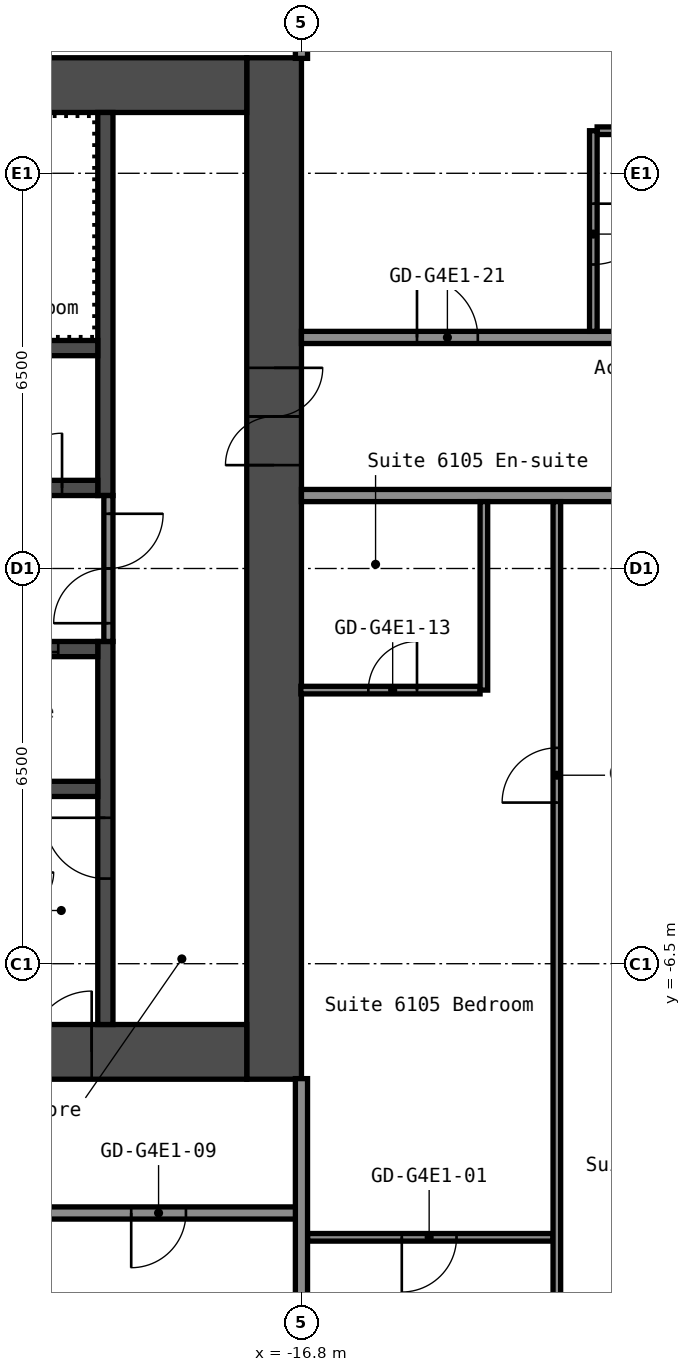
"""IFC4 building model, lengths in metres.
Left out: names, types, materials, properties, quantities, classifications, styles, units other than length and angle.
Written with IfcOpenShell. Run it as: python <this file> out.ifc"""

import sys

from ifc_helpers import new_model, si_unit, direction, frame, frame_2d, origin, place, context, subcontext, project, spatial, rectangle, extrude, element, fill, save


model = new_model("IFC4")
c1 = context("Model", 3, precision=1e-05, world=origin(), true_north=direction((0.0, 1.0)))
c2 = subcontext(c1, "Body", "Model", "MODEL_VIEW")
j1 = project(units=[si_unit("LENGTHUNIT", "METRE"), si_unit("PLANEANGLEUNIT", "RADIAN")], contexts=[c1])
p1 = place(None, origin())
s1 = spatial("IfcSite", under=j1, at=p1, CompositionType="ELEMENT")
p2 = place(p1, origin())
s2 = spatial("IfcBuilding", under=s1, at=p2, CompositionType="ELEMENT")
p3 = place(p2, frame((0.0, 0.0, 215.4)))
s3 = spatial("IfcBuildingStorey", under=s2, at=p3, CompositionType="ELEMENT", Elevation=215.4)
p4 = place(p3, frame((-17.25, -8.4, 0.0), z_axis=(0.0, 0.0, 1.0), x_axis=(0.0, 1.0, 0.0)))
e1 = element("IfcWall", 1, at=p4, inside=s3, PredefinedType="SHEAR", context=c2, shape_type="SweptSolid", body=[
    extrude(rectangle(XDim=16.8, YDim=0.9, at=frame_2d((8.4, 0.0))), origin(), (0.0, 0.0, 1.0), 2.75),
])
p5 = place(p4, frame((10.1, 0.0, 0.0)))
e2 = element("IfcOpeningElement", 2, at=p5, cuts=e1, PredefinedType="OPENING", context=c2, shape_type="SweptSolid", body=[
    extrude(rectangle(XDim=1.6, YDim=2.1, at=frame_2d((0.8, 1.05))), frame((0.0, 0.46, 0.0), z_axis=(0.0, -1.0, 0.0), x_axis=(1.0, 0.0, 0.0)), (0.0, 0.0, 1.0), 0.92),
])
p6 = place(p3, frame((-32.7, 7.95, 0.0), z_axis=(0.0, 0.0, 1.0), x_axis=(1.0, 0.0, 0.0)))
e3 = element("IfcWall", 3, at=p6, inside=s3, PredefinedType="SHEAR", context=c2, shape_type="SweptSolid", body=[
    extrude(rectangle(XDim=15.0, YDim=0.9, at=frame_2d((7.5, 0.0))), origin(), (0.0, 0.0, 1.0), 2.75),
])
p7 = place(p6, frame((3.4, 0.0, 0.0)))
e4 = element("IfcOpeningElement", 4, at=p7, cuts=e3, PredefinedType="OPENING", context=c2, shape_type="SweptSolid", body=[
    extrude(rectangle(XDim=1.2, YDim=2.1, at=frame_2d((0.6, 1.05))), frame((0.0, 0.46, 0.0), z_axis=(0.0, -1.0, 0.0), x_axis=(1.0, 0.0, 0.0)), (0.0, 0.0, 1.0), 0.92),
])
p8 = place(p6, frame((0.75, 0.0, 0.0)))
e5 = element("IfcOpeningElement", 5, at=p8, cuts=e3, PredefinedType="OPENING", context=c2, shape_type="SweptSolid", body=[
    extrude(rectangle(XDim=0.9, YDim=2.1, at=frame_2d((0.45, 1.05))), frame((0.0, 0.46, 0.0), z_axis=(0.0, -1.0, 0.0), x_axis=(1.0, 0.0, 0.0)), (0.0, 0.0, 1.0), 0.92),
])
p9 = place(p3, frame((-32.7, -7.95, 0.0), z_axis=(0.0, 0.0, 1.0), x_axis=(1.0, 0.0, 0.0)))
e6 = element("IfcWall", 6, at=p9, inside=s3, PredefinedType="SHEAR", context=c2, shape_type="SweptSolid", body=[
    extrude(rectangle(XDim=15.0, YDim=0.9, at=frame_2d((7.5, 0.0))), origin(), (0.0, 0.0, 1.0), 2.75),
])
p10 = place(p9, frame((11.45, 0.0, 0.0)))
e7 = element("IfcOpeningElement", 7, at=p10, cuts=e6, PredefinedType="OPENING", context=c2, shape_type="SweptSolid", body=[
    extrude(rectangle(XDim=1.0, YDim=2.1, at=frame_2d((0.5, 1.05))), frame((0.0, 0.46, 0.0), z_axis=(0.0, -1.0, 0.0), x_axis=(1.0, 0.0, 0.0)), (0.0, 0.0, 1.0), 0.92),
])
p11 = place(p3, frame((-20.025, 1.2, 0.0), z_axis=(0.0, 0.0, 1.0), x_axis=(0.0, 1.0, 0.0)))
e8 = element("IfcWall", 8, at=p11, inside=s3, PredefinedType="SHEAR", context=c2, shape_type="SweptSolid", body=[
    extrude(rectangle(XDim=6.3, YDim=0.25, at=frame_2d((3.15, 0.0))), origin(), (0.0, 0.0, 1.0), 2.75),
])
p12 = place(p3, frame((-20.025, -7.5, 0.0), z_axis=(0.0, 0.0, 1.0), x_axis=(0.0, 1.0, 0.0)))
e9 = element("IfcWall", 9, at=p12, inside=s3, PredefinedType="SHEAR", context=c2, shape_type="SweptSolid", body=[
    extrude(rectangle(XDim=6.3, YDim=0.25, at=frame_2d((3.15, 0.0))), origin(), (0.0, 0.0, 1.0), 2.75),
])
p13 = place(p12, frame((2.4, 0.0, 0.0)))
e10 = element("IfcOpeningElement", 10, at=p13, cuts=e9, PredefinedType="OPENING", context=c2, shape_type="SweptSolid", body=[
    extrude(rectangle(XDim=1.0, YDim=2.1, at=frame_2d((0.5, 1.05))), frame((0.0, 0.135, 0.0), z_axis=(0.0, -1.0, 0.0), x_axis=(1.0, 0.0, 0.0)), (0.0, 0.0, 1.0), 0.27),
])
p14 = place(p3, frame((-27.65, 1.325, 0.0), z_axis=(0.0, 0.0, 1.0), x_axis=(1.0, 0.0, 0.0)))
e11 = element("IfcWall", 11, at=p14, inside=s3, PredefinedType="SHEAR", context=c2, shape_type="SweptSolid", body=[
    extrude(rectangle(XDim=7.5, YDim=0.25, at=frame_2d((3.75, 0.0))), origin(), (0.0, 0.0, 1.0), 2.75),
])
p15 = place(p14, frame((6.012, 0.0, 0.0)))
e12 = element("IfcOpeningElement", 12, at=p15, cuts=e11, PredefinedType="OPENING", context=c2, shape_type="SweptSolid", body=[
    extrude(rectangle(XDim=0.9, YDim=2.1, at=frame_2d((0.45, 1.05))), frame((0.0, 0.135, 0.0), z_axis=(0.0, -1.0, 0.0), x_axis=(1.0, 0.0, 0.0)), (0.0, 0.0, 1.0), 0.27),
])
p16 = place(p14, frame((2.312, 0.0, 0.0)))
e13 = element("IfcOpeningElement", 13, at=p16, cuts=e11, PredefinedType="OPENING", context=c2, shape_type="SweptSolid", body=[
    extrude(rectangle(XDim=0.9, YDim=2.1, at=frame_2d((0.45, 1.05))), frame((0.0, 0.135, 0.0), z_axis=(0.0, -1.0, 0.0), x_axis=(1.0, 0.0, 0.0)), (0.0, 0.0, 1.0), 0.27),
])
p17 = place(p3, frame((-27.65, 3.625, 0.0), z_axis=(0.0, 0.0, 1.0), x_axis=(1.0, 0.0, 0.0)))
e14 = element("IfcWall", 14, at=p17, inside=s3, PredefinedType="SHEAR", context=c2, shape_type="SweptSolid", body=[
    extrude(rectangle(XDim=7.5, YDim=0.25, at=frame_2d((3.75, 0.0))), origin(), (0.0, 0.0, 1.0), 2.75),
])
p18 = place(p3, frame((-27.65, -1.325, 0.0), z_axis=(0.0, 0.0, 1.0), x_axis=(1.0, 0.0, 0.0)))
e15 = element("IfcWall", 15, at=p18, inside=s3, PredefinedType="SHEAR", context=c2, shape_type="SweptSolid", body=[
    extrude(rectangle(XDim=7.5, YDim=0.25, at=frame_2d((3.75, 0.0))), origin(), (0.0, 0.0, 1.0), 2.75),
])
p19 = place(p18, frame((5.75, 0.0, 0.0)))
e16 = element("IfcOpeningElement", 16, at=p19, cuts=e15, PredefinedType="OPENING", context=c2, shape_type="SweptSolid", body=[
    extrude(rectangle(XDim=1.1, YDim=2.1, at=frame_2d((0.55, 1.05))), frame((0.0, 0.135, 0.0), z_axis=(0.0, -1.0, 0.0), x_axis=(1.0, 0.0, 0.0)), (0.0, 0.0, 1.0), 0.27),
])
p20 = place(p18, frame((3.35, 0.0, 0.0)))
e17 = element("IfcOpeningElement", 17, at=p20, cuts=e15, PredefinedType="OPENING", context=c2, shape_type="SweptSolid", body=[
    extrude(rectangle(XDim=1.1, YDim=2.1, at=frame_2d((0.55, 1.05))), frame((0.0, 0.135, 0.0), z_axis=(0.0, -1.0, 0.0), x_axis=(1.0, 0.0, 0.0)), (0.0, 0.0, 1.0), 0.27),
])
p21 = place(p18, frame((0.95, 0.0, 0.0)))
e18 = element("IfcOpeningElement", 18, at=p21, cuts=e15, PredefinedType="OPENING", context=c2, shape_type="SweptSolid", body=[
    extrude(rectangle(XDim=1.1, YDim=2.1, at=frame_2d((0.55, 1.05))), frame((0.0, 0.135, 0.0), z_axis=(0.0, -1.0, 0.0), x_axis=(1.0, 0.0, 0.0)), (0.0, 0.0, 1.0), 0.27),
])
p22 = place(p3, frame((-27.65, -3.625, 0.0), z_axis=(0.0, 0.0, 1.0), x_axis=(1.0, 0.0, 0.0)))
e19 = element("IfcWall", 19, at=p22, inside=s3, PredefinedType="SHEAR", context=c2, shape_type="SweptSolid", body=[
    extrude(rectangle(XDim=7.5, YDim=0.25, at=frame_2d((3.75, 0.0))), origin(), (0.0, 0.0, 1.0), 2.75),
])
p23 = place(p3, frame((-19.975, -1.2, 0.0), z_axis=(0.0, 0.0, 1.0), x_axis=(0.0, 1.0, 0.0)))
e20 = element("IfcWall", 20, at=p23, inside=s3, PredefinedType="PARTITIONING", context=c2, shape_type="SweptSolid", body=[
    extrude(rectangle(XDim=2.4, YDim=0.15, at=frame_2d((1.2, 0.0))), origin(), (0.0, 0.0, 1.0), 2.75),
])
p24 = place(p23, frame((0.3, 0.0, 0.0)))
e21 = element("IfcOpeningElement", 21, at=p24, cuts=e20, PredefinedType="OPENING", context=c2, shape_type="SweptSolid", body=[
    extrude(rectangle(XDim=1.8, YDim=2.1, at=frame_2d((0.9, 1.05))), frame((0.0, 0.085, 0.0), z_axis=(0.0, -1.0, 0.0), x_axis=(1.0, 0.0, 0.0)), (0.0, 0.0, 1.0), 0.17),
])
p25 = place(p3, frame((-16.7, -11.0, 0.0), z_axis=(0.0, 0.0, 1.0), x_axis=(1.0, 0.0, 0.0)))
e22 = element("IfcWall", 22, at=p25, inside=s3, PredefinedType="PARTITIONING", context=c2, shape_type="SweptSolid", body=[
    extrude(rectangle(XDim=4.037, YDim=0.125, at=frame_2d((2.019, 0.0))), origin(), (0.0, 0.0, 1.0), 2.75),
])
p26 = place(p25, frame((1.55, 0.0, 0.0)))
e23 = element("IfcOpeningElement", 23, at=p26, cuts=e22, PredefinedType="OPENING", context=c2, shape_type="SweptSolid", body=[
    extrude(rectangle(XDim=0.9, YDim=2.1, at=frame_2d((0.45, 1.05))), frame((0.0, 0.073, 0.0), z_axis=(0.0, -1.0, 0.0), x_axis=(1.0, 0.0, 0.0)), (0.0, 0.0, 1.0), 0.145),
])
p27 = place(p3, frame((-38.1, -10.6, 0.0), z_axis=(0.0, 0.0, 1.0), x_axis=(1.0, 0.0, 0.0)))
e24 = element("IfcWall", 24, at=p27, inside=s3, PredefinedType="PARTITIONING", context=c2, shape_type="SweptSolid", body=[
    extrude(rectangle(XDim=21.3, YDim=0.2, at=frame_2d((10.65, 0.0))), origin(), (0.0, 0.0, 1.0), 2.75),
])
p28 = place(p27, frame((1.95, 0.0, 0.0)))
e25 = element("IfcOpeningElement", 25, at=p28, cuts=e24, PredefinedType="OPENING", context=c2, shape_type="SweptSolid", body=[
    extrude(rectangle(XDim=0.9, YDim=2.1, at=frame_2d((0.45, 1.05))), frame((0.0, 0.11, 0.0), z_axis=(0.0, -1.0, 0.0), x_axis=(1.0, 0.0, 0.0)), (0.0, 0.0, 1.0), 0.22),
])
p29 = place(p27, frame((6.4, 0.0, 0.0)))
e26 = element("IfcOpeningElement", 26, at=p29, cuts=e24, PredefinedType="OPENING", context=c2, shape_type="SweptSolid", body=[
    extrude(rectangle(XDim=0.9, YDim=2.1, at=frame_2d((0.45, 1.05))), frame((0.0, 0.11, 0.0), z_axis=(0.0, -1.0, 0.0), x_axis=(1.0, 0.0, 0.0)), (0.0, 0.0, 1.0), 0.22),
])
p30 = place(p27, frame((10.6, 0.0, 0.0)))
e27 = element("IfcOpeningElement", 27, at=p30, cuts=e24, PredefinedType="OPENING", context=c2, shape_type="SweptSolid", body=[
    extrude(rectangle(XDim=0.9, YDim=2.1, at=frame_2d((0.45, 1.05))), frame((0.0, 0.11, 0.0), z_axis=(0.0, -1.0, 0.0), x_axis=(1.0, 0.0, 0.0)), (0.0, 0.0, 1.0), 0.22),
])
p31 = place(p27, frame((14.3, 0.0, 0.0)))
e28 = element("IfcOpeningElement", 28, at=p31, cuts=e24, PredefinedType="OPENING", context=c2, shape_type="SweptSolid", body=[
    extrude(rectangle(XDim=0.9, YDim=2.1, at=frame_2d((0.45, 1.05))), frame((0.0, 0.11, 0.0), z_axis=(0.0, -1.0, 0.0), x_axis=(1.0, 0.0, 0.0)), (0.0, 0.0, 1.0), 0.22),
])
p32 = place(p27, frame((18.5, 0.0, 0.0)))
e29 = element("IfcOpeningElement", 29, at=p32, cuts=e24, PredefinedType="OPENING", context=c2, shape_type="SweptSolid", body=[
    extrude(rectangle(XDim=0.9, YDim=2.1, at=frame_2d((0.45, 1.05))), frame((0.0, 0.11, 0.0), z_axis=(0.0, -1.0, 0.0), x_axis=(1.0, 0.0, 0.0)), (0.0, 0.0, 1.0), 0.22),
])
p33 = place(p3, frame((-16.81, -2.0, 0.0), z_axis=(0.0, 0.0, 1.0), x_axis=(1.0, 0.0, 0.0)))
e30 = element("IfcWall", 30, at=p33, inside=s3, PredefinedType="PARTITIONING", context=c2, shape_type="SweptSolid", body=[
    extrude(rectangle(XDim=2.948, YDim=0.125, at=frame_2d((1.474, 0.0))), origin(), (0.0, 0.0, 1.0), 2.75),
])
p34 = place(p33, frame((1.11, 0.0, 0.0)))
e31 = element("IfcOpeningElement", 31, at=p34, cuts=e30, PredefinedType="OPENING", context=c2, shape_type="SweptSolid", body=[
    extrude(rectangle(XDim=0.8, YDim=2.1, at=frame_2d((0.4, 1.05))), frame((0.0, 0.073, 0.0), z_axis=(0.0, -1.0, 0.0), x_axis=(1.0, 0.0, 0.0)), (0.0, 0.0, 1.0), 0.145),
])
p35 = place(p3, frame((-16.8, 1.2, 0.0), z_axis=(0.0, 0.0, 1.0), x_axis=(1.0, 0.0, 0.0)))
e32 = element("IfcWall", 32, at=p35, inside=s3, PredefinedType="PARTITIONING", context=c2, shape_type="SweptSolid", body=[
    extrude(rectangle(XDim=33.6, YDim=0.2, at=frame_2d((16.8, 0.0))), origin(), (0.0, 0.0, 1.0), 2.75),
])
p36 = place(p35, frame((5.8, 0.0, 0.0)))
e33 = element("IfcOpeningElement", 33, at=p36, cuts=e32, PredefinedType="OPENING", context=c2, shape_type="SweptSolid", body=[
    extrude(rectangle(XDim=1.0, YDim=2.1, at=frame_2d((0.5, 1.05))), frame((0.0, 0.11, 0.0), z_axis=(0.0, -1.0, 0.0), x_axis=(1.0, 0.0, 0.0)), (0.0, 0.0, 1.0), 0.22),
])
p37 = place(p35, frame((10.0, 0.0, 0.0)))
e34 = element("IfcOpeningElement", 34, at=p37, cuts=e32, PredefinedType="OPENING", context=c2, shape_type="SweptSolid", body=[
    extrude(rectangle(XDim=1.0, YDim=2.1, at=frame_2d((0.5, 1.05))), frame((0.0, 0.11, 0.0), z_axis=(0.0, -1.0, 0.0), x_axis=(1.0, 0.0, 0.0)), (0.0, 0.0, 1.0), 0.22),
])
p38 = place(p35, frame((18.4, 0.0, 0.0)))
e35 = element("IfcOpeningElement", 35, at=p38, cuts=e32, PredefinedType="OPENING", context=c2, shape_type="SweptSolid", body=[
    extrude(rectangle(XDim=1.0, YDim=2.1, at=frame_2d((0.5, 1.05))), frame((0.0, 0.11, 0.0), z_axis=(0.0, -1.0, 0.0), x_axis=(1.0, 0.0, 0.0)), (0.0, 0.0, 1.0), 0.22),
])
p39 = place(p35, frame((31.0, 0.0, 0.0)))
e36 = element("IfcOpeningElement", 36, at=p39, cuts=e32, PredefinedType="OPENING", context=c2, shape_type="SweptSolid", body=[
    extrude(rectangle(XDim=1.0, YDim=2.1, at=frame_2d((0.5, 1.05))), frame((0.0, 0.11, 0.0), z_axis=(0.0, -1.0, 0.0), x_axis=(1.0, 0.0, 0.0)), (0.0, 0.0, 1.0), 0.22),
])
p40 = place(p3, frame((-16.8, 3.8, 0.0), z_axis=(0.0, 0.0, 1.0), x_axis=(1.0, 0.0, 0.0)))
e37 = element("IfcWall", 37, at=p40, inside=s3, PredefinedType="PARTITIONING", context=c2, shape_type="SweptSolid", body=[
    extrude(rectangle(XDim=33.6, YDim=0.2, at=frame_2d((16.8, 0.0))), origin(), (0.0, 0.0, 1.0), 2.75),
])
p41 = place(p40, frame((1.9, 0.0, 0.0)))
e38 = element("IfcOpeningElement", 38, at=p41, cuts=e37, PredefinedType="OPENING", context=c2, shape_type="SweptSolid", body=[
    extrude(rectangle(XDim=1.0, YDim=2.1, at=frame_2d((0.5, 1.05))), frame((0.0, 0.11, 0.0), z_axis=(0.0, -1.0, 0.0), x_axis=(1.0, 0.0, 0.0)), (0.0, 0.0, 1.0), 0.22),
])
p42 = place(p40, frame((10.0, 0.0, 0.0)))
e39 = element("IfcOpeningElement", 39, at=p42, cuts=e37, PredefinedType="OPENING", context=c2, shape_type="SweptSolid", body=[
    extrude(rectangle(XDim=1.0, YDim=2.1, at=frame_2d((0.5, 1.05))), frame((0.0, 0.11, 0.0), z_axis=(0.0, -1.0, 0.0), x_axis=(1.0, 0.0, 0.0)), (0.0, 0.0, 1.0), 0.22),
])
p43 = place(p40, frame((18.4, 0.0, 0.0)))
e40 = element("IfcOpeningElement", 40, at=p43, cuts=e37, PredefinedType="OPENING", context=c2, shape_type="SweptSolid", body=[
    extrude(rectangle(XDim=1.0, YDim=2.1, at=frame_2d((0.5, 1.05))), frame((0.0, 0.11, 0.0), z_axis=(0.0, -1.0, 0.0), x_axis=(1.0, 0.0, 0.0)), (0.0, 0.0, 1.0), 0.22),
])
p44 = place(p40, frame((26.8, 0.0, 0.0)))
e41 = element("IfcOpeningElement", 41, at=p44, cuts=e37, PredefinedType="OPENING", context=c2, shape_type="SweptSolid", body=[
    extrude(rectangle(XDim=1.0, YDim=2.1, at=frame_2d((0.5, 1.05))), frame((0.0, 0.11, 0.0), z_axis=(0.0, -1.0, 0.0), x_axis=(1.0, 0.0, 0.0)), (0.0, 0.0, 1.0), 0.22),
])
p45 = place(p3, frame((-11.938, 7.2, 0.0), z_axis=(0.0, 0.0, 1.0), x_axis=(1.0, 0.0, 0.0)))
e42 = element("IfcWall", 42, at=p45, inside=s3, PredefinedType="PARTITIONING", context=c2, shape_type="SweptSolid", body=[
    extrude(rectangle(XDim=3.438, YDim=0.125, at=frame_2d((1.719, 0.0))), origin(), (0.0, 0.0, 1.0), 2.75),
])
p46 = place(p3, frame((-16.8, -15.55, 0.0), z_axis=(0.0, 0.0, 1.0), x_axis=(0.0, 1.0, 0.0)))
e43 = element("IfcWall", 43, at=p46, inside=s3, PredefinedType="PARTITIONING", context=c2, shape_type="SweptSolid", body=[
    extrude(rectangle(XDim=7.16, YDim=0.2, at=frame_2d((3.58, 0.0))), origin(), (0.0, 0.0, 1.0), 2.75),
])
p47 = place(p3, frame((-16.8, 8.39, 0.0), z_axis=(0.0, 0.0, 1.0), x_axis=(0.0, 1.0, 0.0)))
e44 = element("IfcWall", 44, at=p47, inside=s3, PredefinedType="PARTITIONING", context=c2, shape_type="SweptSolid", body=[
    extrude(rectangle(XDim=12.16, YDim=0.2, at=frame_2d((6.08, 0.0))), origin(), (0.0, 0.0, 1.0), 2.75),
])
p48 = place(p3, frame((-13.8, -2.0, 0.0), z_axis=(0.0, 0.0, 1.0), x_axis=(0.0, 1.0, 0.0)))
e45 = element("IfcWall", 45, at=p48, inside=s3, PredefinedType="PARTITIONING", context=c2, shape_type="SweptSolid", body=[
    extrude(rectangle(XDim=3.1, YDim=0.125, at=frame_2d((1.55, 0.0))), origin(), (0.0, 0.0, 1.0), 2.75),
])
p49 = place(p3, frame((-12.6, -15.55, 0.0), z_axis=(0.0, 0.0, 1.0), x_axis=(0.0, 1.0, 0.0)))
e46 = element("IfcWall", 46, at=p49, inside=s3, PredefinedType="PARTITIONING", context=c2, shape_type="SweptSolid", body=[
    extrude(rectangle(XDim=16.65, YDim=0.125, at=frame_2d((8.325, 0.0))), origin(), (0.0, 0.0, 1.0), 2.75),
])
p50 = place(p49, frame((11.7, 0.0, 0.0)))
e47 = element("IfcOpeningElement", 47, at=p50, cuts=e46, PredefinedType="OPENING", context=c2, shape_type="SweptSolid", body=[
    extrude(rectangle(XDim=0.9, YDim=2.1, at=frame_2d((0.45, 1.05))), frame((0.0, 0.073, 0.0), z_axis=(0.0, -1.0, 0.0), x_axis=(1.0, 0.0, 0.0)), (0.0, 0.0, 1.0), 0.145),
])
p51 = place(p3, frame((-12.0, 3.9, 0.0), z_axis=(0.0, 0.0, 1.0), x_axis=(0.0, 1.0, 0.0)))
e48 = element("IfcWall", 48, at=p51, inside=s3, PredefinedType="PARTITIONING", context=c2, shape_type="SweptSolid", body=[
    extrude(rectangle(XDim=3.3, YDim=0.125, at=frame_2d((1.65, 0.0))), origin(), (0.0, 0.0, 1.0), 2.75),
])
p52 = place(p51, frame((1.1, 0.0, 0.0)))
e49 = element("IfcOpeningElement", 49, at=p52, cuts=e48, PredefinedType="OPENING", context=c2, shape_type="SweptSolid", body=[
    extrude(rectangle(XDim=1.0, YDim=2.1, at=frame_2d((0.5, 1.05))), frame((0.0, 0.073, 0.0), z_axis=(0.0, -1.0, 0.0), x_axis=(1.0, 0.0, 0.0)), (0.0, 0.0, 1.0), 0.145),
])
p53 = place(p5, origin())
e50 = element("IfcDoor", 50, at=p53, inside=s3, OperationType="DOUBLE_DOOR_SINGLE_SWING", PredefinedType="DOOR", context=c2, shape_type="SweptSolid", body=[
    extrude(rectangle(XDim=1.6, YDim=2.1, at=frame_2d((0.8, 1.05))), frame((0.0, 0.025, 0.0), z_axis=(0.0, -1.0, 0.0), x_axis=(1.0, 0.0, 0.0)), (0.0, 0.0, 1.0), 0.05),
])
fill(e2, e50)
p54 = place(p10, origin())
e51 = element("IfcDoor", 51, at=p54, inside=s3, OperationType="SINGLE_SWING_LEFT", PredefinedType="DOOR", context=c2, shape_type="SweptSolid", body=[
    extrude(rectangle(XDim=1.0, YDim=2.1, at=frame_2d((0.5, 1.05))), frame((0.0, 0.025, 0.0), z_axis=(0.0, -1.0, 0.0), x_axis=(1.0, 0.0, 0.0)), (0.0, 0.0, 1.0), 0.05),
])
fill(e7, e51)
p55 = place(p13, origin())
e52 = element("IfcDoor", 52, at=p55, inside=s3, OperationType="SINGLE_SWING_LEFT", PredefinedType="DOOR", context=c2, shape_type="SweptSolid", body=[
    extrude(rectangle(XDim=1.0, YDim=2.1, at=frame_2d((0.5, 1.05))), frame((0.0, 0.025, 0.0), z_axis=(0.0, -1.0, 0.0), x_axis=(1.0, 0.0, 0.0)), (0.0, 0.0, 1.0), 0.05),
])
fill(e10, e52)
p56 = place(p24, origin())
e53 = element("IfcDoor", 53, at=p56, inside=s3, OperationType="DOUBLE_DOOR_SINGLE_SWING", PredefinedType="DOOR", context=c2, shape_type="SweptSolid", body=[
    extrude(rectangle(XDim=1.8, YDim=2.1, at=frame_2d((0.9, 1.05))), frame((0.0, 0.025, 0.0), z_axis=(0.0, -1.0, 0.0), x_axis=(1.0, 0.0, 0.0)), (0.0, 0.0, 1.0), 0.05),
])
fill(e21, e53)
p57 = place(p15, origin())
e54 = element("IfcDoor", 54, at=p57, inside=s3, OperationType="SINGLE_SWING_LEFT", PredefinedType="DOOR", context=c2, shape_type="SweptSolid", body=[
    extrude(rectangle(XDim=0.9, YDim=2.1, at=frame_2d((0.45, 1.05))), frame((0.0, 0.025, 0.0), z_axis=(0.0, -1.0, 0.0), x_axis=(1.0, 0.0, 0.0)), (0.0, 0.0, 1.0), 0.05),
])
fill(e12, e54)
p58 = place(p19, origin())
e55 = element("IfcDoor", 55, at=p58, inside=s3, OperationType="DOUBLE_DOOR_SLIDING", PredefinedType="DOOR", context=c2, shape_type="SweptSolid", body=[
    extrude(rectangle(XDim=1.1, YDim=2.1, at=frame_2d((0.55, 1.05))), frame((0.0, 0.025, 0.0), z_axis=(0.0, -1.0, 0.0), x_axis=(1.0, 0.0, 0.0)), (0.0, 0.0, 1.0), 0.05),
])
fill(e16, e55)
p59 = place(p26, origin())
e56 = element("IfcDoor", 56, at=p59, inside=s3, OperationType="SINGLE_SWING_LEFT", PredefinedType="DOOR", context=c2, shape_type="SweptSolid", body=[
    extrude(rectangle(XDim=0.9, YDim=2.1, at=frame_2d((0.45, 1.05))), frame((0.0, 0.025, 0.0), z_axis=(0.0, -1.0, 0.0), x_axis=(1.0, 0.0, 0.0)), (0.0, 0.0, 1.0), 0.05),
])
fill(e23, e56)
p60 = place(p32, origin())
e57 = element("IfcDoor", 57, at=p60, inside=s3, OperationType="SINGLE_SWING_LEFT", PredefinedType="DOOR", context=c2, shape_type="SweptSolid", body=[
    extrude(rectangle(XDim=0.9, YDim=2.1, at=frame_2d((0.45, 1.05))), frame((0.0, 0.025, 0.0), z_axis=(0.0, -1.0, 0.0), x_axis=(1.0, 0.0, 0.0)), (0.0, 0.0, 1.0), 0.05),
])
fill(e29, e57)
p61 = place(p34, origin())
e58 = element("IfcDoor", 58, at=p61, inside=s3, OperationType="SINGLE_SWING_LEFT", PredefinedType="DOOR", context=c2, shape_type="SweptSolid", body=[
    extrude(rectangle(XDim=0.8, YDim=2.1, at=frame_2d((0.4, 1.05))), frame((0.0, 0.025, 0.0), z_axis=(0.0, -1.0, 0.0), x_axis=(1.0, 0.0, 0.0)), (0.0, 0.0, 1.0), 0.05),
])
fill(e31, e58)
p62 = place(p41, origin())
e59 = element("IfcDoor", 59, at=p62, inside=s3, OperationType="SINGLE_SWING_RIGHT", PredefinedType="DOOR", context=c2, shape_type="SweptSolid", body=[
    extrude(rectangle(XDim=1.0, YDim=2.1, at=frame_2d((0.5, 1.05))), frame((0.0, 0.025, 0.0), z_axis=(0.0, -1.0, 0.0), x_axis=(1.0, 0.0, 0.0)), (0.0, 0.0, 1.0), 0.05),
])
fill(e38, e59)
p63 = place(p50, origin())
e60 = element("IfcDoor", 60, at=p63, inside=s3, OperationType="SINGLE_SWING_RIGHT", PredefinedType="DOOR", context=c2, shape_type="SweptSolid", body=[
    extrude(rectangle(XDim=0.9, YDim=2.1, at=frame_2d((0.45, 1.05))), frame((0.0, 0.025, 0.0), z_axis=(0.0, -1.0, 0.0), x_axis=(1.0, 0.0, 0.0)), (0.0, 0.0, 1.0), 0.05),
])
fill(e47, e60)
p64 = place(p52, origin())
e61 = element("IfcDoor", 61, at=p64, inside=s3, OperationType="SINGLE_SWING_RIGHT", PredefinedType="DOOR", context=c2, shape_type="SweptSolid", body=[
    extrude(rectangle(XDim=1.0, YDim=2.1, at=frame_2d((0.5, 1.05))), frame((0.0, 0.025, 0.0), z_axis=(0.0, -1.0, 0.0), x_axis=(1.0, 0.0, 0.0)), (0.0, 0.0, 1.0), 0.05),
])
fill(e49, e61)
save(model, sys.argv[1])
